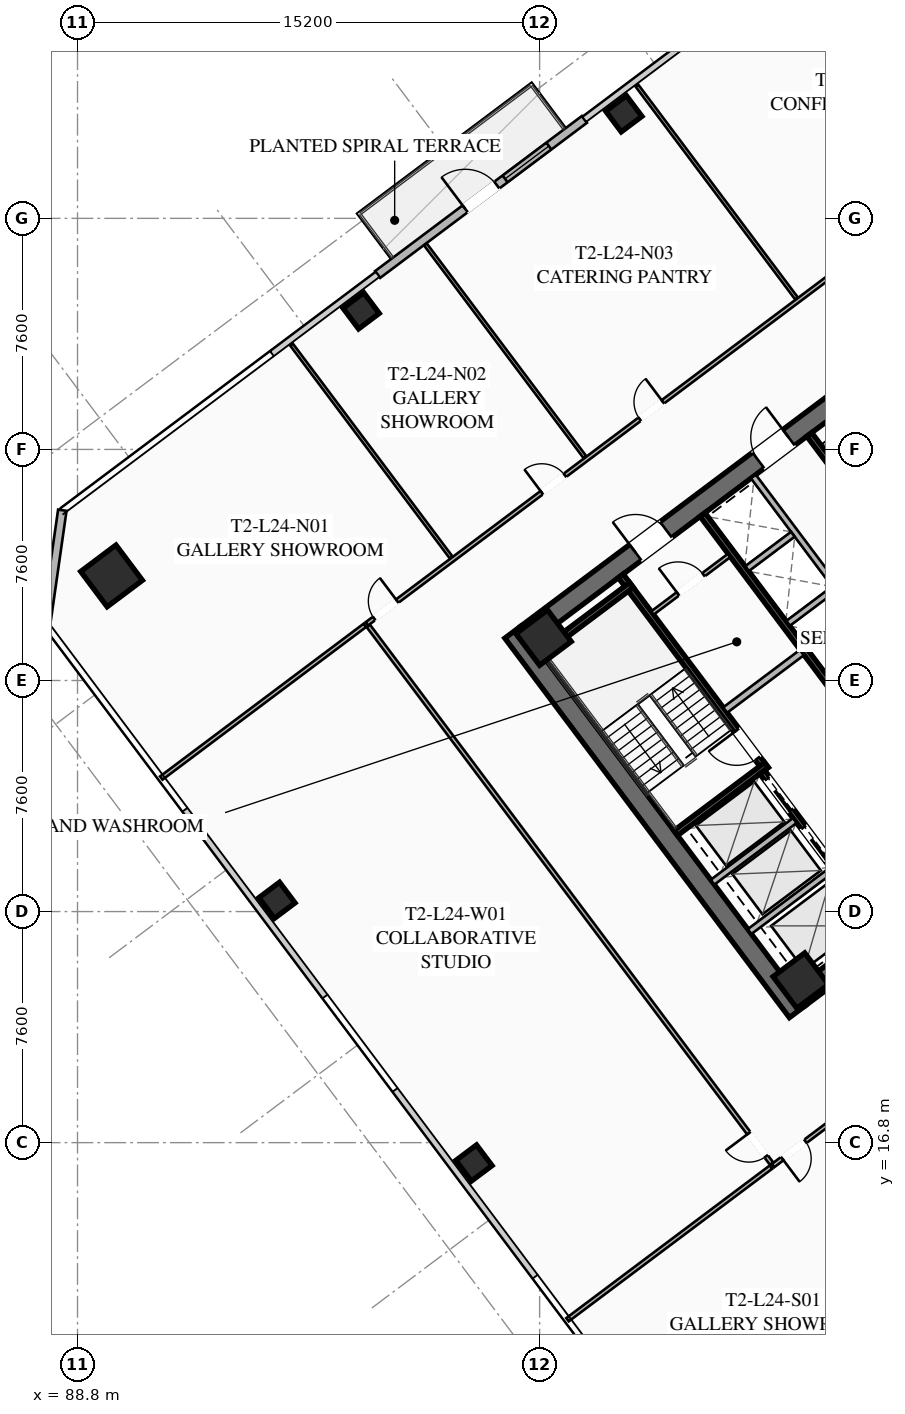
"""IFC4 building model, lengths in metres.
Left out: names, types, materials, properties, quantities, classifications, styles, units other than length and angle.
Written with IfcOpenShell. Run it as: python <this file> out.ifc"""

import sys

from ifc_helpers import new_model, si_unit, direction, frame, frame_2d, origin, origin_2d, place, context, subcontext, project, spatial, rectangle, hollow_rectangle, extrude, element, fill, save


model = new_model("IFC4")
c1 = context("Model", 3, precision=1e-05, world=origin(), true_north=direction((0.0, 1.0)))
c2 = subcontext(c1, "Body", "Model", "MODEL_VIEW")
j1 = project(units=[si_unit("LENGTHUNIT", "METRE"), si_unit("PLANEANGLEUNIT", "RADIAN")], contexts=[c1])
p1 = place(None, origin())
s1 = spatial("IfcSite", under=j1, at=p1, CompositionType="ELEMENT")
p2 = place(p1, origin())
s2 = spatial("IfcBuilding", under=s1, at=p2, CompositionType="ELEMENT")
p3 = place(p2, frame((0.0, 0.0, 92.05)))
s3 = spatial("IfcBuildingStorey", under=s2, at=p3, CompositionType="ELEMENT", Elevation=92.05)
p4 = place(p3, frame((112.476, 21.107, 0.0), z_axis=(0.0, 0.0, 1.0), x_axis=(-0.600005007985, 0.799996243986, 0.0)))
e1 = element("IfcWall", 1, at=p4, inside=s3, PredefinedType="SHEAR", context=c2, shape_type="SweptSolid", body=[
    extrude(rectangle(XDim=15.6, YDim=0.65, at=frame_2d((7.8, 0.0))), origin(), (0.0, 0.0, 1.0), 3.55),
])
p5 = place(p3, frame((124.429, 30.478, 0.0), z_axis=(0.0, 0.0, 1.0), x_axis=(-0.799998028465, -0.600002628705, 0.0)))
e2 = element("IfcWall", 2, at=p5, inside=s3, PredefinedType="SHEAR", context=c2, shape_type="SweptSolid", body=[
    extrude(rectangle(XDim=14.86, YDim=0.65, at=frame_2d((7.43, 0.0))), origin(), (0.0, 0.0, 1.0), 3.55),
])
p6 = place(p5, frame((9.13, 0.0, 0.0)))
e3 = element("IfcOpeningElement", 3, at=p6, cuts=e2, PredefinedType="OPENING", context=c2, shape_type="SweptSolid", body=[
    extrude(rectangle(XDim=1.25, YDim=2.25, at=frame_2d((0.625, 1.125))), frame((0.0, 0.335, 0.0), z_axis=(0.0, -1.0, 0.0), x_axis=(1.0, 0.0, 0.0)), (0.0, 0.0, 1.0), 0.67),
])
p7 = place(p5, frame((4.08, 0.0, 0.0)))
e4 = element("IfcOpeningElement", 4, at=p7, cuts=e2, PredefinedType="OPENING", context=c2, shape_type="SweptSolid", body=[
    extrude(rectangle(XDim=1.25, YDim=2.25, at=frame_2d((0.625, 1.125))), frame((0.0, 0.335, 0.0), z_axis=(0.0, -1.0, 0.0), x_axis=(1.0, 0.0, 0.0)), (0.0, 0.0, 1.0), 0.67),
])
p8 = place(p3, frame((103.571, 33.522, 0.0), z_axis=(0.0, 0.0, 1.0), x_axis=(0.799998028465, 0.600002628705, 0.0)))
e5 = element("IfcWall", 5, at=p8, inside=s3, PredefinedType="SHEAR", context=c2, shape_type="SweptSolid", body=[
    extrude(rectangle(XDim=14.86, YDim=0.65, at=frame_2d((7.43, 0.0))), origin(), (0.0, 0.0, 1.0), 3.55),
])
p9 = place(p8, frame((4.48, 0.0, 0.0)))
e6 = element("IfcOpeningElement", 6, at=p9, cuts=e5, PredefinedType="OPENING", context=c2, shape_type="SweptSolid", body=[
    extrude(rectangle(XDim=1.25, YDim=2.25, at=frame_2d((0.625, 1.125))), frame((0.0, 0.335, 0.0), z_axis=(0.0, -1.0, 0.0), x_axis=(1.0, 0.0, 0.0)), (0.0, 0.0, 1.0), 0.67),
])
p10 = place(p8, frame((9.53, 0.0, 0.0)))
e7 = element("IfcOpeningElement", 7, at=p10, cuts=e5, PredefinedType="OPENING", context=c2, shape_type="SweptSolid", body=[
    extrude(rectangle(XDim=1.25, YDim=2.25, at=frame_2d((0.625, 1.125))), frame((0.0, 0.335, 0.0), z_axis=(0.0, -1.0, 0.0), x_axis=(1.0, 0.0, 0.0)), (0.0, 0.0, 1.0), 0.67),
])
for number, where, z_axis, x_axis in (
    (8, (112.59, 22.13, 0.0), (0.0, 0.0, 1.0), (0.8, 0.6, 0.0)),
    (9, (104.13, 33.41, 0.0), (0.0, 0.0, 1.0), (0.8, 0.6, 0.0)),
):
    element("IfcColumn", number, at=place(p3, frame(where, z_axis=z_axis, x_axis=x_axis)), inside=s3, PredefinedType="COLUMN", context=c2, shape_type="SweptSolid", body=[
        extrude(hollow_rectangle(XDim=1.3, YDim=1.3, WallThickness=0.05, at=origin_2d()), origin(), (0.0, 0.0, 1.0), 3.35),
    ])
p11 = place(p3, frame((89.92, 35.44, 0.0), z_axis=(0.0, 0.0, 1.0), x_axis=(0.799999996291, 0.600000004945, 0.0)))
e10 = element("IfcColumn", 10, at=p11, inside=s3, PredefinedType="COLUMN", context=c2, shape_type="SweptSolid", body=[
    extrude(hollow_rectangle(XDim=1.45, YDim=1.45, WallThickness=0.055, at=origin_2d()), origin(), (0.0, 0.0, 1.0), 3.35),
])
for number, where, z_axis, x_axis in (
    (11, (106.77, 50.64, 0.0), (0.0, 0.0, 1.0), (0.8, 0.6, 0.0)),
    (12, (98.13, 44.16, 0.0), (0.0, 0.0, 1.0), (0.8, 0.6, 0.0)),
    (13, (95.36, 24.77, 0.0), (0.0, 0.0, 1.0), (0.8, 0.6, 0.0)),
    (14, (101.84, 16.13, 0.0), (0.0, 0.0, 1.0), (0.8, 0.6, 0.0)),
):
    element("IfcColumn", number, at=place(p3, frame(where, z_axis=z_axis, x_axis=x_axis)), inside=s3, PredefinedType="COLUMN", context=c2, shape_type="SweptSolid", body=[
        extrude(hollow_rectangle(XDim=0.85, YDim=0.85, WallThickness=0.035, at=origin_2d()), origin(), (0.0, 0.0, 1.0), 3.35),
    ])
p12 = place(p3, frame((98.672, 45.354, 0.0), z_axis=(0.0, 0.0, 1.0), x_axis=(0.799986212866, 0.600018382406, 0.0)))
e15 = element("IfcWall", 15, at=p12, inside=s3, PredefinedType="SOLIDWALL", context=c2, shape_type="SweptSolid", body=[
    extrude(rectangle(XDim=8.5, YDim=0.28, at=frame_2d((4.25, 0.0))), origin(), (0.0, 0.0, 1.0), 3.35),
])
p13 = place(p12, frame((3.6, 0.0, 0.0)))
e16 = element("IfcOpeningElement", 16, at=p13, cuts=e15, PredefinedType="OPENING", context=c2, shape_type="SweptSolid", body=[
    extrude(rectangle(XDim=1.3, YDim=2.15, at=frame_2d((0.65, 1.075))), frame((0.0, 0.15, 0.0), z_axis=(0.0, -1.0, 0.0), x_axis=(1.0, 0.0, 0.0)), (0.0, 0.0, 1.0), 0.3),
])
p14 = place(p12, frame((5.24, 0.0, 0.85)))
e17 = element("IfcOpeningElement", 17, at=p14, cuts=e15, PredefinedType="OPENING", context=c2, shape_type="SweptSolid", body=[
    extrude(rectangle(XDim=1.8, YDim=1.92, at=frame_2d((0.9, 0.96))), frame((0.0, 0.15, 0.0), z_axis=(0.0, -1.0, 0.0), x_axis=(1.0, 0.0, 0.0)), (0.0, 0.0, 1.0), 0.3),
])
p15 = place(p3, frame((87.76, 33.82, 0.0), z_axis=(0.0, 0.0, 1.0), x_axis=(0.141430307517, 0.989948214866, 0.0)))
e18 = element("IfcWall", 18, at=p15, inside=s3, PredefinedType="SOLIDWALL", context=c2, shape_type="SweptSolid", body=[
    extrude(rectangle(XDim=3.818, YDim=0.28, at=frame_2d((1.909, 0.0))), origin(), (0.0, 0.0, 1.0), 3.35),
])
p16 = place(p3, frame((111.44, 29.08, 0.0), z_axis=(0.0, 0.0, 1.0), x_axis=(-0.600009827119, 0.799992629566, 0.0)))
e19 = element("IfcWall", 19, at=p16, inside=s3, PredefinedType="SHEAR", context=c2, shape_type="SweptSolid", body=[
    extrude(rectangle(XDim=7.95, YDim=0.2, at=frame_2d((3.975, 0.0))), origin(), (0.0, 0.0, 1.0), 3.35),
])
p17 = place(p16, frame((0.45, 0.0, 0.0)))
e20 = element("IfcOpeningElement", 20, at=p17, cuts=e19, PredefinedType="OPENING", context=c2, shape_type="SweptSolid", body=[
    extrude(rectangle(XDim=1.15, YDim=2.2, at=frame_2d((0.575, 1.1))), frame((0.0, 0.11, 0.0), z_axis=(0.0, -1.0, 0.0), x_axis=(1.0, 0.0, 0.0)), (0.0, 0.0, 1.0), 0.22),
])
for number, where, z_axis, x_axis in (
    (21, (108.476, 26.982, 0.0), (0.0, 0.0, 1.0), (0.8, 0.6, 0.0)),
    (22, (104.036, 32.902, 0.0), (0.0, 0.0, 1.0), (0.8, 0.6, 0.0)),
):
    element("IfcWall", number, at=place(p3, frame(where, z_axis=z_axis, x_axis=x_axis)), inside=s3, PredefinedType="SHEAR", context=c2, shape_type="SweptSolid", body=[
        extrude(rectangle(XDim=3.73, YDim=0.2, at=frame_2d((1.865, 0.0))), origin(), (0.0, 0.0, 1.0), 3.35),
    ])
p18 = place(p3, frame((117.938, 26.016, 0.0), z_axis=(0.0, 0.0, 1.0), x_axis=(-0.600005463273, 0.799995902516, 0.0)))
e23 = element("IfcWall", 23, at=p18, inside=s3, PredefinedType="SHEAR", context=c2, shape_type="SweptSolid", body=[
    extrude(rectangle(XDim=14.3, YDim=0.2, at=frame_2d((7.15, 0.0))), origin(), (0.0, 0.0, 1.0), 3.35),
])
p19 = place(p3, frame((110.104, 31.028, 0.0), z_axis=(0.0, 0.0, 1.0), x_axis=(0.800018601094, 0.59997519774, 0.0)))
e24 = element("IfcWall", 24, at=p19, inside=s3, PredefinedType="SOLIDWALL", context=c2, shape_type="SweptSolid", body=[
    extrude(rectangle(XDim=3.15, YDim=0.22, at=frame_2d((1.575, 0.0))), origin(), (0.0, 0.0, 1.0), 2.703),
])
p20 = place(p3, frame((115.13, 23.91, 0.0), z_axis=(0.0, 0.0, 1.0), x_axis=(-0.599975393228, 0.800018454488, 0.0)))
e25 = element("IfcWall", 25, at=p20, inside=s3, PredefinedType="SHEAR", context=c2, shape_type="SweptSolid", body=[
    extrude(rectangle(XDim=6.35, YDim=0.2, at=frame_2d((3.175, 0.0))), origin(), (0.0, 0.0, 1.0), 3.35),
])
p21 = place(p20, frame((4.775, 0.0, 0.0)))
e26 = element("IfcOpeningElement", 26, at=p21, cuts=e25, PredefinedType="OPENING", context=c2, shape_type="SweptSolid", body=[
    extrude(rectangle(XDim=1.3, YDim=2.25, at=frame_2d((0.65, 1.125))), frame((0.0, 0.11, 0.0), z_axis=(0.0, -1.0, 0.0), x_axis=(1.0, 0.0, 0.0)), (0.0, 0.0, 1.0), 0.22),
])
p22 = place(p20, frame((2.775, 0.0, 0.0)))
e27 = element("IfcOpeningElement", 27, at=p22, cuts=e25, PredefinedType="OPENING", context=c2, shape_type="SweptSolid", body=[
    extrude(rectangle(XDim=1.3, YDim=2.25, at=frame_2d((0.65, 1.125))), frame((0.0, 0.11, 0.0), z_axis=(0.0, -1.0, 0.0), x_axis=(1.0, 0.0, 0.0)), (0.0, 0.0, 1.0), 0.22),
])
p23 = place(p20, frame((0.575, 0.0, 0.0)))
e28 = element("IfcOpeningElement", 28, at=p23, cuts=e25, PredefinedType="OPENING", context=c2, shape_type="SweptSolid", body=[
    extrude(rectangle(XDim=1.3, YDim=2.25, at=frame_2d((0.65, 1.125))), frame((0.0, 0.11, 0.0), z_axis=(0.0, -1.0, 0.0), x_axis=(1.0, 0.0, 0.0)), (0.0, 0.0, 1.0), 0.22),
])
for number, where, z_axis, x_axis in (
    (29, (110.906, 23.742, 0.0), (0.0, 0.0, 1.0), (0.8, 0.6, 0.0)),
    (30, (109.688, 25.366, 0.0), (0.0, 0.0, 1.0), (0.8, 0.6, 0.0)),
):
    element("IfcWall", number, at=place(p3, frame(where, z_axis=z_axis, x_axis=x_axis)), inside=s3, PredefinedType="SOLIDWALL", context=c2, shape_type="SweptSolid", body=[
        extrude(rectangle(XDim=3.38, YDim=0.2, at=frame_2d((1.69, 0.0))), origin(), (0.0, 0.0, 1.0), 3.35),
    ])
p24 = place(p3, frame((112.87, 40.09, 0.0), z_axis=(0.0, 0.0, 1.0), x_axis=(0.599975393228, -0.800018454488, 0.0)))
e31 = element("IfcWall", 31, at=p24, inside=s3, PredefinedType="SHEAR", context=c2, shape_type="SweptSolid", body=[
    extrude(rectangle(XDim=6.35, YDim=0.2, at=frame_2d((3.175, 0.0))), origin(), (0.0, 0.0, 1.0), 3.35),
])
p25 = place(p3, frame((107.71, 34.22, 0.0), z_axis=(0.0, 0.0, 1.0), x_axis=(0.799981399002, 0.60002480053, 0.0)))
e32 = element("IfcWall", 32, at=p25, inside=s3, PredefinedType="PARTITIONING", context=c2, shape_type="SweptSolid", body=[
    extrude(rectangle(XDim=3.15, YDim=0.135, at=frame_2d((1.575, 0.0))), origin(), (0.0, 0.0, 1.0), 2.703),
])
p26 = place(p25, frame((1.05, 0.0, 0.0)))
e33 = element("IfcOpeningElement", 33, at=p26, cuts=e32, PredefinedType="OPENING", context=c2, shape_type="SweptSolid", body=[
    extrude(rectangle(XDim=1.05, YDim=2.2, at=frame_2d((0.525, 1.1))), frame((0.0, 0.077, 0.0), z_axis=(0.0, -1.0, 0.0), x_axis=(1.0, 0.0, 0.0)), (0.0, 0.0, 1.0), 0.155),
])
p27 = place(p3, frame((115.11, 33.27, 0.0), z_axis=(0.0, 0.0, 1.0), x_axis=(-0.600011488909, 0.79999138319, 0.0)))
e34 = element("IfcWall", 34, at=p27, inside=s3, PredefinedType="SOLIDWALL", context=c2, shape_type="SweptSolid", body=[
    extrude(rectangle(XDim=6.8, YDim=0.2, at=frame_2d((3.4, 0.0))), origin(), (0.0, 0.0, 1.0), 3.35),
])
p28 = place(p3, frame((112.176, 33.882, 0.0), z_axis=(0.0, 0.0, 1.0), x_axis=(0.8, 0.6, 0.0)))
e35 = element("IfcWall", 35, at=p28, inside=s3, PredefinedType="SOLIDWALL", context=c2, shape_type="SweptSolid", body=[
    extrude(rectangle(XDim=1.88, YDim=0.2, at=frame_2d((0.94, 0.0))), origin(), (0.0, 0.0, 1.0), 3.35),
])
p29 = place(p3, frame((110.826, 35.682, 0.0), z_axis=(0.0, 0.0, 1.0), x_axis=(0.799984418148, 0.600020775241, 0.0)))
e36 = element("IfcWall", 36, at=p29, inside=s3, PredefinedType="SOLIDWALL", context=c2, shape_type="SweptSolid", body=[
    extrude(rectangle(XDim=1.88, YDim=0.2, at=frame_2d((0.94, 0.0))), origin(), (0.0, 0.0, 1.0), 3.35),
])
p30 = place(p3, frame((98.316, 33.862, 0.0), z_axis=(0.0, 0.0, 1.0), x_axis=(0.8000041147, 0.599994513695, 0.0)))
e37 = element("IfcWall", 37, at=p30, inside=s3, PredefinedType="PARTITIONING", context=c2, shape_type="SweptSolid", body=[
    extrude(rectangle(XDim=28.48, YDim=0.135, at=frame_2d((14.24, 0.0))), origin(), (0.0, 0.0, 1.0), 2.703),
])
p31 = place(p30, frame((0.3, 0.0, 0.0)))
e38 = element("IfcOpeningElement", 38, at=p31, cuts=e37, PredefinedType="OPENING", context=c2, shape_type="SweptSolid", body=[
    extrude(rectangle(XDim=0.95, YDim=2.05, at=frame_2d((0.475, 1.025))), frame((0.0, 0.077, 0.0), z_axis=(0.0, -1.0, 0.0), x_axis=(1.0, 0.0, 0.0)), (0.0, 0.0, 1.0), 0.155),
])
p32 = place(p30, frame((7.195, 0.0, 0.0)))
e39 = element("IfcOpeningElement", 39, at=p32, cuts=e37, PredefinedType="OPENING", context=c2, shape_type="SweptSolid", body=[
    extrude(rectangle(XDim=0.95, YDim=2.05, at=frame_2d((0.475, 1.025))), frame((0.0, 0.077, 0.0), z_axis=(0.0, -1.0, 0.0), x_axis=(1.0, 0.0, 0.0)), (0.0, 0.0, 1.0), 0.155),
])
p33 = place(p30, frame((11.222, 0.0, 0.0)))
e40 = element("IfcOpeningElement", 40, at=p33, cuts=e37, PredefinedType="OPENING", context=c2, shape_type="SweptSolid", body=[
    extrude(rectangle(XDim=0.95, YDim=2.05, at=frame_2d((0.475, 1.025))), frame((0.0, 0.077, 0.0), z_axis=(0.0, -1.0, 0.0), x_axis=(1.0, 0.0, 0.0)), (0.0, 0.0, 1.0), 0.155),
])
p34 = place(p30, frame((27.23, 0.0, 0.0)))
e41 = element("IfcOpeningElement", 41, at=p34, cuts=e37, PredefinedType="OPENING", context=c2, shape_type="SweptSolid", body=[
    extrude(rectangle(XDim=0.95, YDim=2.05, at=frame_2d((0.475, 1.025))), frame((0.0, 0.077, 0.0), z_axis=(0.0, -1.0, 0.0), x_axis=(1.0, 0.0, 0.0)), (0.0, 0.0, 1.0), 0.155),
])
for number, where, z_axis, x_axis in (
    (42, (101.092, 36.044, 0.0), (0.0, 0.0, 1.0), (-0.6, 0.8, 0.0)),
    (43, (105.492, 39.344, 0.0), (0.0, 0.0, 1.0), (-0.6, 0.8, 0.0)),
    (44, (112.452, 44.564, 0.0), (0.0, 0.0, 1.0), (-0.6, 0.8, 0.0)),
):
    element("IfcWall", number, at=place(p3, frame(where, z_axis=z_axis, x_axis=x_axis)), inside=s3, PredefinedType="PARTITIONING", context=c2, shape_type="SweptSolid", body=[
        extrude(rectangle(XDim=8.75, YDim=0.11, at=frame_2d((4.375, 0.0))), origin(), (0.0, 0.0, 1.0), 2.703),
    ])
p35 = place(p3, frame((134.462, 33.134, 0.0), z_axis=(0.0, 0.0, 1.0), x_axis=(-0.799996913945, -0.600004114717, 0.0)))
e45 = element("IfcWall", 45, at=p35, inside=s3, PredefinedType="PARTITIONING", context=c2, shape_type="SweptSolid", body=[
    extrude(rectangle(XDim=28.48, YDim=0.135, at=frame_2d((14.24, 0.0))), origin(), (0.0, 0.0, 1.0), 2.703),
])
p36 = place(p35, frame((27.15, 0.0, 0.0)))
e46 = element("IfcOpeningElement", 46, at=p36, cuts=e45, PredefinedType="OPENING", context=c2, shape_type="SweptSolid", body=[
    extrude(rectangle(XDim=0.95, YDim=2.05, at=frame_2d((0.475, 1.025))), frame((0.0, 0.077, 0.0), z_axis=(0.0, -1.0, 0.0), x_axis=(1.0, 0.0, 0.0)), (0.0, 0.0, 1.0), 0.155),
])
p37 = place(p35, frame((0.38, 0.0, 0.0)))
e47 = element("IfcOpeningElement", 47, at=p37, cuts=e45, PredefinedType="OPENING", context=c2, shape_type="SweptSolid", body=[
    extrude(rectangle(XDim=0.95, YDim=2.05, at=frame_2d((0.475, 1.025))), frame((0.0, 0.077, 0.0), z_axis=(0.0, -1.0, 0.0), x_axis=(1.0, 0.0, 0.0)), (0.0, 0.0, 1.0), 0.155),
])
p38 = place(p3, frame((111.63, 16.11, 0.0), z_axis=(0.0, 0.0, 1.0), x_axis=(-0.599996466511, 0.800002650104, 0.0)))
e48 = element("IfcWall", 48, at=p38, inside=s3, PredefinedType="PARTITIONING", context=c2, shape_type="SweptSolid", body=[
    extrude(rectangle(XDim=22.11, YDim=0.135, at=frame_2d((11.055, 0.0))), origin(), (0.0, 0.0, 1.0), 2.703),
])
p39 = place(p38, frame((0.3, 0.0, 0.0)))
e49 = element("IfcOpeningElement", 49, at=p39, cuts=e48, PredefinedType="OPENING", context=c2, shape_type="SweptSolid", body=[
    extrude(rectangle(XDim=0.95, YDim=2.05, at=frame_2d((0.475, 1.025))), frame((0.0, 0.077, 0.0), z_axis=(0.0, -1.0, 0.0), x_axis=(1.0, 0.0, 0.0)), (0.0, 0.0, 1.0), 0.155),
])
for number, where, z_axis, x_axis in (
    (50, (98.252, 33.814, 0.0), (0.0, 0.0, 1.0), (-0.8, -0.6, 0.0)),
    (51, (104.918, 10.976, 0.0), (0.0, 0.0, 1.0), (0.8, 0.6, 0.0)),
):
    element("IfcWall", number, at=place(p3, frame(where, z_axis=z_axis, x_axis=x_axis)), inside=s3, PredefinedType="PARTITIONING", context=c2, shape_type="SweptSolid", body=[
        extrude(rectangle(XDim=8.37, YDim=0.135, at=frame_2d((4.185, 0.0))), origin(), (0.0, 0.0, 1.0), 2.703),
    ])
p40 = place(p13, origin())
e52 = element("IfcDoor", 52, at=p40, inside=s3, OperationType="SINGLE_SWING_LEFT", PredefinedType="DOOR", context=c2, shape_type="SweptSolid", body=[
    extrude(rectangle(XDim=1.3, YDim=2.15, at=frame_2d((0.65, 1.075))), frame((0.0, 0.025, 0.0), z_axis=(0.0, -1.0, 0.0), x_axis=(1.0, 0.0, 0.0)), (0.0, 0.0, 1.0), 0.05),
])
fill(e16, e52)
p41 = place(p14, origin())
e53 = element("IfcWindow", 53, at=p41, inside=s3, PartitioningType="SINGLE_PANEL", PredefinedType="WINDOW", context=c2, shape_type="SweptSolid", body=[
    extrude(rectangle(XDim=1.8, YDim=1.92, at=frame_2d((0.9, 0.96))), frame((0.0, 0.03, 0.0), z_axis=(0.0, -1.0, 0.0), x_axis=(1.0, 0.0, 0.0)), (0.0, 0.0, 1.0), 0.06),
])
fill(e17, e53)
p42 = place(p9, origin())
e54 = element("IfcDoor", 54, at=p42, inside=s3, OperationType="SINGLE_SWING_LEFT", PredefinedType="DOOR", context=c2, shape_type="SweptSolid", body=[
    extrude(rectangle(XDim=1.25, YDim=2.25, at=frame_2d((0.625, 1.125))), frame((0.0, 0.025, 0.0), z_axis=(0.0, -1.0, 0.0), x_axis=(1.0, 0.0, 0.0)), (0.0, 0.0, 1.0), 0.05),
])
fill(e6, e54)
p43 = place(p10, origin())
e55 = element("IfcDoor", 55, at=p43, inside=s3, OperationType="SINGLE_SWING_RIGHT", PredefinedType="DOOR", context=c2, shape_type="SweptSolid", body=[
    extrude(rectangle(XDim=1.25, YDim=2.25, at=frame_2d((0.625, 1.125))), frame((0.0, 0.025, 0.0), z_axis=(0.0, -1.0, 0.0), x_axis=(1.0, 0.0, 0.0)), (0.0, 0.0, 1.0), 0.05),
])
fill(e7, e55)
p44 = place(p17, origin())
e56 = element("IfcDoor", 56, at=p44, inside=s3, OperationType="SINGLE_SWING_RIGHT", PredefinedType="DOOR", context=c2, shape_type="SweptSolid", body=[
    extrude(rectangle(XDim=1.15, YDim=2.2, at=frame_2d((0.575, 1.1))), frame((0.0, 0.025, 0.0), z_axis=(0.0, -1.0, 0.0), x_axis=(1.0, 0.0, 0.0)), (0.0, 0.0, 1.0), 0.05),
])
fill(e20, e56)
p45 = place(p26, origin())
e57 = element("IfcDoor", 57, at=p45, inside=s3, OperationType="SINGLE_SWING_LEFT", PredefinedType="DOOR", context=c2, shape_type="SweptSolid", body=[
    extrude(rectangle(XDim=1.05, YDim=2.2, at=frame_2d((0.525, 1.1))), frame((0.0, 0.025, 0.0), z_axis=(0.0, -1.0, 0.0), x_axis=(1.0, 0.0, 0.0)), (0.0, 0.0, 1.0), 0.05),
])
fill(e33, e57)
p46 = place(p31, origin())
e58 = element("IfcDoor", 58, at=p46, inside=s3, OperationType="SINGLE_SWING_RIGHT", PredefinedType="DOOR", context=c2, shape_type="SweptSolid", body=[
    extrude(rectangle(XDim=0.95, YDim=2.05, at=frame_2d((0.475, 1.025))), frame((0.0, 0.025, 0.0), z_axis=(0.0, -1.0, 0.0), x_axis=(1.0, 0.0, 0.0)), (0.0, 0.0, 1.0), 0.05),
])
fill(e38, e58)
p47 = place(p32, origin())
e59 = element("IfcDoor", 59, at=p47, inside=s3, OperationType="SINGLE_SWING_LEFT", PredefinedType="DOOR", context=c2, shape_type="SweptSolid", body=[
    extrude(rectangle(XDim=0.95, YDim=2.05, at=frame_2d((0.475, 1.025))), frame((0.0, 0.025, 0.0), z_axis=(0.0, -1.0, 0.0), x_axis=(1.0, 0.0, 0.0)), (0.0, 0.0, 1.0), 0.05),
])
fill(e39, e59)
p48 = place(p33, origin())
e60 = element("IfcDoor", 60, at=p48, inside=s3, OperationType="SINGLE_SWING_RIGHT", PredefinedType="DOOR", context=c2, shape_type="SweptSolid", body=[
    extrude(rectangle(XDim=0.95, YDim=2.05, at=frame_2d((0.475, 1.025))), frame((0.0, 0.025, 0.0), z_axis=(0.0, -1.0, 0.0), x_axis=(1.0, 0.0, 0.0)), (0.0, 0.0, 1.0), 0.05),
])
fill(e40, e60)
p49 = place(p36, origin())
e61 = element("IfcDoor", 61, at=p49, inside=s3, OperationType="SINGLE_SWING_RIGHT", PredefinedType="DOOR", context=c2, shape_type="SweptSolid", body=[
    extrude(rectangle(XDim=0.95, YDim=2.05, at=frame_2d((0.475, 1.025))), frame((0.0, 0.025, 0.0), z_axis=(0.0, -1.0, 0.0), x_axis=(1.0, 0.0, 0.0)), (0.0, 0.0, 1.0), 0.05),
])
fill(e46, e61)
p50 = place(p39, origin())
e62 = element("IfcDoor", 62, at=p50, inside=s3, OperationType="SINGLE_SWING_RIGHT", PredefinedType="DOOR", context=c2, shape_type="SweptSolid", body=[
    extrude(rectangle(XDim=0.95, YDim=2.05, at=frame_2d((0.475, 1.025))), frame((0.0, 0.025, 0.0), z_axis=(0.0, -1.0, 0.0), x_axis=(1.0, 0.0, 0.0)), (0.0, 0.0, 1.0), 0.05),
])
fill(e49, e62)
p51 = place(p21, origin())
e63 = element("IfcDoor", 63, at=p51, inside=s3, OperationType="SLIDING_TO_LEFT", PredefinedType="DOOR", context=c2, shape_type="SweptSolid", body=[
    extrude(rectangle(XDim=1.3, YDim=2.25, at=frame_2d((0.65, 1.125))), frame((0.0, 0.025, 0.0), z_axis=(0.0, -1.0, 0.0), x_axis=(1.0, 0.0, 0.0)), (0.0, 0.0, 1.0), 0.05),
])
fill(e26, e63)
p52 = place(p22, origin())
e64 = element("IfcDoor", 64, at=p52, inside=s3, OperationType="SLIDING_TO_LEFT", PredefinedType="DOOR", context=c2, shape_type="SweptSolid", body=[
    extrude(rectangle(XDim=1.3, YDim=2.25, at=frame_2d((0.65, 1.125))), frame((0.0, 0.025, 0.0), z_axis=(0.0, -1.0, 0.0), x_axis=(1.0, 0.0, 0.0)), (0.0, 0.0, 1.0), 0.05),
])
fill(e27, e64)
save(model, sys.argv[1])
